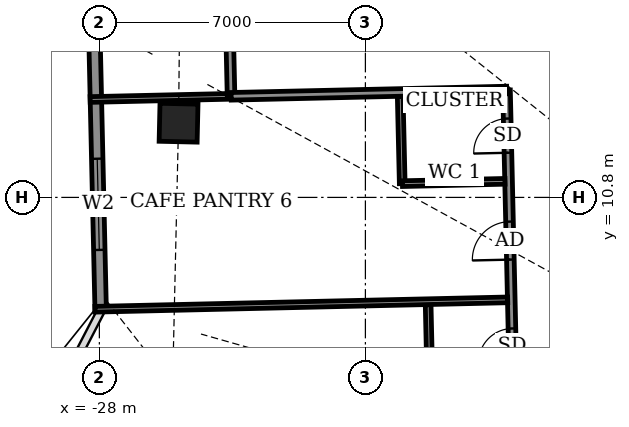
"""IFC4 building model, lengths in metres.
Left out: names, types, materials, properties, quantities, classifications, styles, units other than length and angle.
Written with IfcOpenShell. Run it as: python <this file> out.ifc"""

import sys

from ifc_helpers import new_model, si_unit, direction, frame, frame_2d, origin, origin_2d, place, context, subcontext, project, spatial, rectangle, extrude, element, fill, save


model = new_model("IFC4")
c1 = context("Model", 3, precision=1e-05, world=origin(), true_north=direction((0.0, 1.0)))
c2 = subcontext(c1, "Body", "Model", "MODEL_VIEW")
j1 = project(units=[si_unit("LENGTHUNIT", "METRE"), si_unit("PLANEANGLEUNIT", "RADIAN")], contexts=[c1])
p1 = place(None, origin())
s1 = spatial("IfcSite", under=j1, at=p1, CompositionType="ELEMENT")
p2 = place(p1, origin())
s2 = spatial("IfcBuilding", under=s1, at=p2, CompositionType="ELEMENT")
p3 = place(p2, frame((0.0, 0.0, 275.3)))
s3 = spatial("IfcBuildingStorey", under=s2, at=p3, CompositionType="ELEMENT", Elevation=275.3)
p4 = place(p3, frame((-25.916, 12.766, -0.55), z_axis=(0.0, 0.0, 1.0), x_axis=(-0.022711552501, -0.999742059425, 0.0)))
e1 = element("IfcColumn", 1, at=p4, inside=s3, PredefinedType="COLUMN", context=c2, shape_type="SweptSolid", body=[
    extrude(rectangle(XDim=1.0, YDim=1.0, at=origin_2d()), origin(), (0.0, 0.0, 1.0), 4.6),
])
p5 = place(p3, frame((-28.297, 22.427, 0.0), z_axis=(0.0, 0.0, 1.0), x_axis=(0.02269714286, -0.999742386671, 0.0)))
e2 = element("IfcWall", 2, at=p5, inside=s3, PredefinedType="SOLIDWALL", context=c2, shape_type="SweptSolid", body=[
    extrude(rectangle(XDim=14.629, YDim=0.3, at=frame_2d((7.314, 0.0))), origin(), (0.0, 0.0, 1.0), 2.75),
])
p6 = place(p5, frame((3.7, 0.0, 0.0)))
e3 = element("IfcOpeningElement", 3, at=p6, cuts=e2, PredefinedType="OPENING", context=c2, shape_type="SweptSolid", body=[
    extrude(rectangle(XDim=1.5, YDim=2.4, at=frame_2d((0.75, 1.2))), frame((0.0, 0.16, 0.0), z_axis=(0.0, -1.0, 0.0), x_axis=(1.0, 0.0, 0.0)), (0.0, 0.0, 1.0), 0.32),
])
p7 = place(p5, frame((10.612, 0.0, 0.9)))
e4 = element("IfcOpeningElement", 4, at=p7, cuts=e2, PredefinedType="OPENING", context=c2, shape_type="SweptSolid", body=[
    extrude(rectangle(XDim=2.4, YDim=1.5, at=frame_2d((1.2, 0.75))), frame((0.0, 0.16, 0.0), z_axis=(0.0, -1.0, 0.0), x_axis=(1.0, 0.0, 0.0)), (0.0, 0.0, 1.0), 0.32),
])
p8 = place(p3, frame((-16.684, -12.919, 0.0), z_axis=(0.0, 0.0, 1.0), x_axis=(-0.022712214871, 0.999742044377, 0.0)))
e5 = element("IfcWall", 5, at=p8, inside=s3, PredefinedType="PARTITIONING", context=c2, shape_type="SweptSolid", body=[
    extrude(rectangle(XDim=26.551, YDim=0.2, at=frame_2d((13.275, 0.0))), origin(), (0.0, 0.0, 1.0), 2.55),
])
p9 = place(p8, frame((22.088, 0.0, 0.0)))
e6 = element("IfcOpeningElement", 6, at=p9, cuts=e5, PredefinedType="OPENING", context=c2, shape_type="SweptSolid", body=[
    extrude(rectangle(XDim=1.0, YDim=2.1, at=frame_2d((0.5, 1.05))), frame((0.0, 0.11, 0.0), z_axis=(0.0, -1.0, 0.0), x_axis=(1.0, 0.0, 0.0)), (0.0, 0.0, 1.0), 0.22),
])
p10 = place(p8, frame((24.9, 0.0, 0.0)))
e7 = element("IfcOpeningElement", 7, at=p10, cuts=e5, PredefinedType="OPENING", context=c2, shape_type="SweptSolid", body=[
    extrude(rectangle(XDim=0.9, YDim=2.1, at=frame_2d((0.45, 1.05))), frame((0.0, 0.11, 0.0), z_axis=(0.0, -1.0, 0.0), x_axis=(1.0, 0.0, 0.0)), (0.0, 0.0, 1.0), 0.22),
])
p11 = place(p8, frame((17.0, 0.0, 0.0)))
e8 = element("IfcOpeningElement", 8, at=p11, cuts=e5, PredefinedType="OPENING", context=c2, shape_type="SweptSolid", body=[
    extrude(rectangle(XDim=1.0, YDim=2.1, at=frame_2d((0.5, 1.05))), frame((0.0, 0.11, 0.0), z_axis=(0.0, -1.0, 0.0), x_axis=(1.0, 0.0, 0.0)), (0.0, 0.0, 1.0), 0.22),
])
p12 = place(p8, frame((19.375, 0.0, 0.0)))
e9 = element("IfcOpeningElement", 9, at=p12, cuts=e5, PredefinedType="OPENING", context=c2, shape_type="SweptSolid", body=[
    extrude(rectangle(XDim=0.9, YDim=2.1, at=frame_2d((0.45, 1.05))), frame((0.0, 0.11, 0.0), z_axis=(0.0, -1.0, 0.0), x_axis=(1.0, 0.0, 0.0)), (0.0, 0.0, 1.0), 0.22),
])
p13 = place(p8, frame((12.475, 0.0, 0.0)))
e10 = element("IfcOpeningElement", 10, at=p13, cuts=e5, PredefinedType="OPENING", context=c2, shape_type="SweptSolid", body=[
    extrude(rectangle(XDim=1.0, YDim=2.1, at=frame_2d((0.5, 1.05))), frame((0.0, 0.11, 0.0), z_axis=(0.0, -1.0, 0.0), x_axis=(1.0, 0.0, 0.0)), (0.0, 0.0, 1.0), 0.22),
])
p14 = place(p8, frame((14.725, 0.0, 0.0)))
e11 = element("IfcOpeningElement", 11, at=p14, cuts=e5, PredefinedType="OPENING", context=c2, shape_type="SweptSolid", body=[
    extrude(rectangle(XDim=0.9, YDim=2.1, at=frame_2d((0.45, 1.05))), frame((0.0, 0.11, 0.0), z_axis=(0.0, -1.0, 0.0), x_axis=(1.0, 0.0, 0.0)), (0.0, 0.0, 1.0), 0.22),
])
p15 = place(p8, frame((10.425, 0.0, 0.0)))
e12 = element("IfcOpeningElement", 12, at=p15, cuts=e5, PredefinedType="OPENING", context=c2, shape_type="SweptSolid", body=[
    extrude(rectangle(XDim=1.0, YDim=2.1, at=frame_2d((0.5, 1.05))), frame((0.0, 0.11, 0.0), z_axis=(0.0, -1.0, 0.0), x_axis=(1.0, 0.0, 0.0)), (0.0, 0.0, 1.0), 0.22),
])
p16 = place(p8, frame((8.125, 0.0, 0.0)))
e13 = element("IfcOpeningElement", 13, at=p16, cuts=e5, PredefinedType="OPENING", context=c2, shape_type="SweptSolid", body=[
    extrude(rectangle(XDim=0.9, YDim=2.1, at=frame_2d((0.45, 1.05))), frame((0.0, 0.11, 0.0), z_axis=(0.0, -1.0, 0.0), x_axis=(1.0, 0.0, 0.0)), (0.0, 0.0, 1.0), 0.22),
])
p17 = place(p8, frame((1.937, 0.0, 0.0)))
e14 = element("IfcOpeningElement", 14, at=p17, cuts=e5, PredefinedType="OPENING", context=c2, shape_type="SweptSolid", body=[
    extrude(rectangle(XDim=1.0, YDim=2.1, at=frame_2d((0.5, 1.05))), frame((0.0, 0.11, 0.0), z_axis=(0.0, -1.0, 0.0), x_axis=(1.0, 0.0, 0.0)), (0.0, 0.0, 1.0), 0.22),
])
p18 = place(p8, frame((5.625, 0.0, 0.0)))
e15 = element("IfcOpeningElement", 15, at=p18, cuts=e5, PredefinedType="OPENING", context=c2, shape_type="SweptSolid", body=[
    extrude(rectangle(XDim=0.9, YDim=2.1, at=frame_2d((0.45, 1.05))), frame((0.0, 0.11, 0.0), z_axis=(0.0, -1.0, 0.0), x_axis=(1.0, 0.0, 0.0)), (0.0, 0.0, 1.0), 0.22),
])
p19 = place(p3, frame((-19.296, 5.652, 0.0), z_axis=(0.0, 0.0, 1.0), x_axis=(-0.022895561926, 0.999737862264, 0.0)))
e16 = element("IfcWall", 16, at=p19, inside=s3, PredefinedType="PARTITIONING", context=c2, shape_type="SweptSolid", body=[
    extrude(rectangle(XDim=2.324, YDim=0.15, at=frame_2d((1.162, 0.0))), origin(), (0.0, 0.0, 1.0), 2.85),
])
p20 = place(p3, frame((-28.116, 7.857, 0.0), z_axis=(0.0, 0.0, 1.0), x_axis=(0.999741301527, 0.022744890004, 0.0)))
e17 = element("IfcWall", 17, at=p20, inside=s3, PredefinedType="PARTITIONING", context=c2, shape_type="SweptSolid", body=[
    extrude(rectangle(XDim=10.863, YDim=0.15, at=frame_2d((5.431, 0.0))), origin(), (0.0, 0.0, 1.0), 2.35),
])
p21 = place(p3, frame((-20.031, 11.162, 0.0), z_axis=(0.0, 0.0, 1.0), x_axis=(-0.023039761813, 0.999734549456, 0.0)))
e18 = element("IfcWall", 18, at=p21, inside=s3, PredefinedType="PARTITIONING", context=c2, shape_type="SweptSolid", body=[
    extrude(rectangle(XDim=2.3, YDim=0.15, at=frame_2d((1.15, 0.0))), origin(), (0.0, 0.0, 1.0), 2.75),
])
p22 = place(p3, frame((-20.026, 11.162, 0.0), z_axis=(0.0, 0.0, 1.0), x_axis=(0.999746436932, 0.022518033722, 0.0)))
e19 = element("IfcWall", 19, at=p22, inside=s3, PredefinedType="PARTITIONING", context=c2, shape_type="SweptSolid", body=[
    extrude(rectangle(XDim=2.7, YDim=0.15, at=frame_2d((1.35, 0.0))), origin(), (0.0, 0.0, 1.0), 2.75),
])
p23 = place(p3, frame((-28.242, 13.376, 0.0), z_axis=(0.0, 0.0, 1.0), x_axis=(0.999744407723, 0.022607946112, 0.0)))
e20 = element("IfcWall", 20, at=p23, inside=s3, PredefinedType="PARTITIONING", context=c2, shape_type="SweptSolid", body=[
    extrude(rectangle(XDim=3.715, YDim=0.15, at=frame_2d((1.857, 0.0))), origin(), (0.0, 0.0, 1.0), 2.35),
])
p24 = place(p3, frame((-24.535, 13.46, 0.0), z_axis=(0.0, 0.0, 1.0), x_axis=(-0.022780545013, 0.999740489712, 0.0)))
e21 = element("IfcWall", 21, at=p24, inside=s3, PredefinedType="PARTITIONING", context=c2, shape_type="SweptSolid", body=[
    extrude(rectangle(XDim=1.5, YDim=0.2, at=frame_2d((0.75, 0.0))), origin(), (0.0, 0.0, 1.0), 2.75),
])
p25 = place(p3, frame((-24.532, 13.46, 0.0), z_axis=(0.0, 0.0, 1.0), x_axis=(0.999741000612, 0.022758112756, 0.0)))
e22 = element("IfcWall", 22, at=p25, inside=s3, PredefinedType="PARTITIONING", context=c2, shape_type="SweptSolid", body=[
    extrude(rectangle(XDim=7.252, YDim=0.2, at=frame_2d((3.626, 0.0))), origin(), (0.0, 0.0, 1.0), 2.75),
])
p26 = place(p7, origin())
e23 = element("IfcWindow", 23, at=p26, inside=s3, PartitioningType="DOUBLE_PANEL_VERTICAL", PredefinedType="WINDOW", context=c2, shape_type="SweptSolid", body=[
    extrude(rectangle(XDim=2.4, YDim=1.5, at=frame_2d((1.2, 0.75))), frame((0.0, 0.03, 0.0), z_axis=(0.0, -1.0, 0.0), x_axis=(1.0, 0.0, 0.0)), (0.0, 0.0, 1.0), 0.06),
])
fill(e4, e23)
p27 = place(p9, origin())
e24 = element("IfcDoor", 24, at=p27, inside=s3, OperationType="SINGLE_SWING_RIGHT", PredefinedType="DOOR", context=c2, shape_type="SweptSolid", body=[
    extrude(rectangle(XDim=1.0, YDim=2.1, at=frame_2d((0.5, 1.05))), frame((0.0, 0.025, 0.0), z_axis=(0.0, -1.0, 0.0), x_axis=(1.0, 0.0, 0.0)), (0.0, 0.0, 1.0), 0.05),
])
fill(e6, e24)
p28 = place(p10, origin())
e25 = element("IfcDoor", 25, at=p28, inside=s3, OperationType="SINGLE_SWING_RIGHT", PredefinedType="DOOR", context=c2, shape_type="SweptSolid", body=[
    extrude(rectangle(XDim=0.9, YDim=2.1, at=frame_2d((0.45, 1.05))), frame((0.0, 0.025, 0.0), z_axis=(0.0, -1.0, 0.0), x_axis=(1.0, 0.0, 0.0)), (0.0, 0.0, 1.0), 0.05),
])
fill(e7, e25)
p29 = place(p12, origin())
e26 = element("IfcDoor", 26, at=p29, inside=s3, OperationType="SINGLE_SWING_LEFT", PredefinedType="DOOR", context=c2, shape_type="SweptSolid", body=[
    extrude(rectangle(XDim=0.9, YDim=2.1, at=frame_2d((0.45, 1.05))), frame((0.0, 0.025, 0.0), z_axis=(0.0, -1.0, 0.0), x_axis=(1.0, 0.0, 0.0)), (0.0, 0.0, 1.0), 0.05),
])
fill(e9, e26)
save(model, sys.argv[1])
